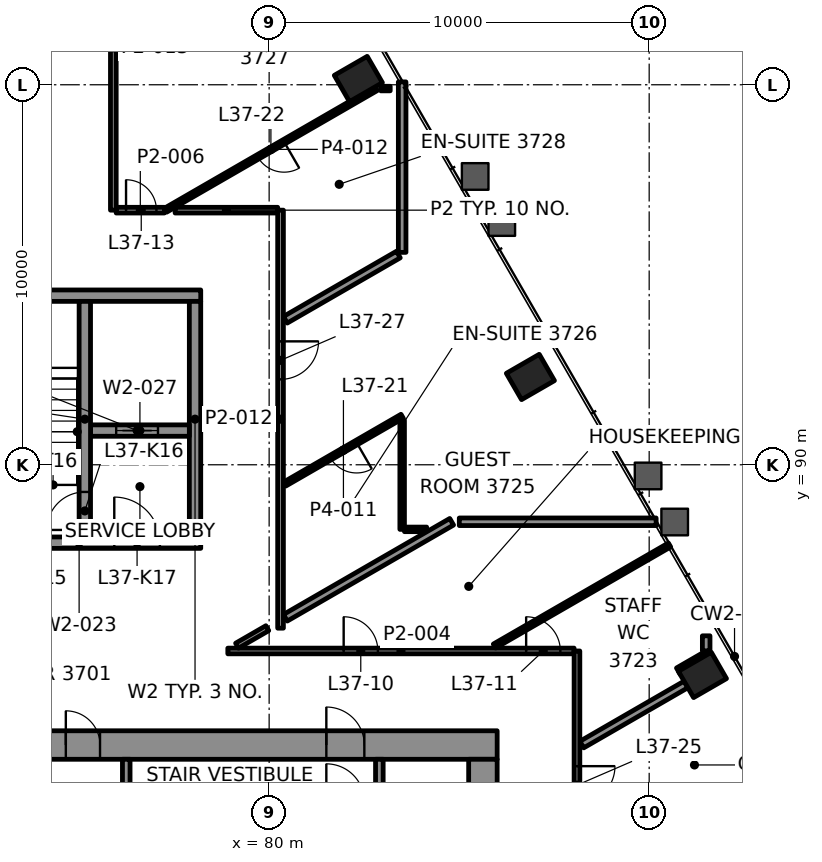
"""IFC4 building model, lengths in metres.
Left out: names, types, materials, properties, quantities, classifications, styles, units other than length and angle.
Written with IfcOpenShell. Run it as: python <this file> out.ifc"""

import sys

from ifc_helpers import new_model, si_unit, direction, frame, frame_2d, origin, origin_2d, place, context, subcontext, project, spatial, rectangle, hollow_rectangle, extrude, element, fill, save


model = new_model("IFC4")
c1 = context("Model", 3, precision=1e-05, world=origin(), true_north=direction((0.0, 1.0)))
c2 = subcontext(c1, "Body", "Model", "MODEL_VIEW")
j1 = project(units=[si_unit("LENGTHUNIT", "METRE"), si_unit("PLANEANGLEUNIT", "RADIAN")], contexts=[c1])
p1 = place(None, origin())
s1 = spatial("IfcSite", under=j1, at=p1, CompositionType="ELEMENT")
p2 = place(p1, origin())
s2 = spatial("IfcBuilding", under=s1, at=p2, CompositionType="ELEMENT")
p3 = place(p2, frame((0.0, 0.0, 163.6)))
s3 = spatial("IfcBuildingStorey", under=s2, at=p3, CompositionType="ELEMENT", Elevation=163.6)
for number, where, z_axis, x_axis in (
    (1, (91.402, 84.469, -0.0), (0.0, 0.0, 1.0), (-0.5, 0.866, 0.0)),
    (2, (86.875, 92.31, -0.0), (0.0, 0.0, 1.0), (-0.5, 0.866, 0.0)),
    (3, (82.348, 100.151, -0.0), (0.0, 0.0, 1.0), (-0.5, 0.866, 0.0)),
):
    element("IfcColumn", number, at=place(p3, frame(where, z_axis=z_axis, x_axis=x_axis)), inside=s3, PredefinedType="COLUMN", context=c2, shape_type="SweptSolid", body=[
        extrude(hollow_rectangle(XDim=0.8, YDim=1.0, WallThickness=0.05, at=origin_2d()), origin(), (0.0, 0.0, 1.0), 3.9),
    ])
p4 = place(p3, frame((64.0, 82.625, 0.0), z_axis=(0.0, 0.0, 1.0), x_axis=(1.0, 0.0, 0.0)))
e4 = element("IfcWall", 4, at=p4, inside=s3, PredefinedType="SHEAR", context=c2, shape_type="SweptSolid", body=[
    extrude(rectangle(XDim=22.0, YDim=0.75, at=frame_2d((11.0, 0.0))), origin(), (0.0, 0.0, 1.0), 3.7),
])
p5 = place(p4, frame((3.695, 0.0, 0.0)))
e5 = element("IfcOpeningElement", 5, at=p5, cuts=e4, PredefinedType="OPENING", context=c2, shape_type="SweptSolid", body=[
    extrude(rectangle(XDim=1.0, YDim=2.1, at=frame_2d((0.5, 1.05))), frame((0.0, 0.385, 0.0), z_axis=(0.0, -1.0, 0.0), x_axis=(1.0, 0.0, 0.0)), (0.0, 0.0, 1.0), 0.77),
])
p6 = place(p4, frame((17.505, 0.0, 0.0)))
e6 = element("IfcOpeningElement", 6, at=p6, cuts=e4, PredefinedType="OPENING", context=c2, shape_type="SweptSolid", body=[
    extrude(rectangle(XDim=1.0, YDim=2.1, at=frame_2d((0.5, 1.05))), frame((0.0, 0.385, 0.0), z_axis=(0.0, -1.0, 0.0), x_axis=(1.0, 0.0, 0.0)), (0.0, 0.0, 1.0), 0.77),
])
p7 = place(p4, frame((10.65, 0.0, 0.0)))
e7 = element("IfcOpeningElement", 7, at=p7, cuts=e4, PredefinedType="OPENING", context=c2, shape_type="SweptSolid", body=[
    extrude(rectangle(XDim=0.9, YDim=2.1, at=frame_2d((0.45, 1.05))), frame((0.0, 0.385, 0.0), z_axis=(0.0, -1.0, 0.0), x_axis=(1.0, 0.0, 0.0)), (0.0, 0.0, 1.0), 0.77),
])
p8 = place(p3, frame((85.625, 67.75, 0.0), z_axis=(0.0, 0.0, 1.0), x_axis=(0.0, 1.0, 0.0)))
e8 = element("IfcWall", 8, at=p8, inside=s3, PredefinedType="SHEAR", context=c2, shape_type="SweptSolid", body=[
    extrude(rectangle(XDim=14.5, YDim=0.75, at=frame_2d((7.25, 0.0))), origin(), (0.0, 0.0, 1.0), 3.7),
])
p9 = place(p8, frame((4.65, 0.0, 0.0)))
e9 = element("IfcOpeningElement", 9, at=p9, cuts=e8, PredefinedType="OPENING", context=c2, shape_type="SweptSolid", body=[
    extrude(rectangle(XDim=1.8, YDim=2.1, at=frame_2d((0.9, 1.05))), frame((0.0, 0.385, 0.0), z_axis=(0.0, -1.0, 0.0), x_axis=(1.0, 0.0, 0.0)), (0.0, 0.0, 1.0), 0.77),
])
p10 = place(p8, frame((11.8, 0.0, 0.0)))
e10 = element("IfcOpeningElement", 10, at=p10, cuts=e8, PredefinedType="OPENING", context=c2, shape_type="SweptSolid", body=[
    extrude(rectangle(XDim=0.9, YDim=2.1, at=frame_2d((0.45, 1.05))), frame((0.0, 0.385, 0.0), z_axis=(0.0, -1.0, 0.0), x_axis=(1.0, 0.0, 0.0)), (0.0, 0.0, 1.0), 0.77),
])
p11 = place(p3, frame((71.8, 87.95, 0.0), z_axis=(0.0, 0.0, 1.0), x_axis=(1.0, 0.0, 0.0)))
e11 = element("IfcWall", 11, at=p11, inside=s3, PredefinedType="SHEAR", context=c2, shape_type="SweptSolid", body=[
    extrude(rectangle(XDim=6.4, YDim=0.3, at=frame_2d((3.2, 0.0))), origin(), (0.0, 0.0, 1.0), 3.7),
])
p12 = place(p11, frame((1.325, 0.0, 0.0)))
e12 = element("IfcOpeningElement", 12, at=p12, cuts=e11, PredefinedType="OPENING", context=c2, shape_type="SweptSolid", body=[
    extrude(rectangle(XDim=1.0, YDim=2.1, at=frame_2d((0.5, 1.05))), frame((0.0, 0.16, 0.0), z_axis=(0.0, -1.0, 0.0), x_axis=(1.0, 0.0, 0.0)), (0.0, 0.0, 1.0), 0.32),
])
p13 = place(p11, frame((4.125, 0.0, 0.0)))
e13 = element("IfcOpeningElement", 13, at=p13, cuts=e11, PredefinedType="OPENING", context=c2, shape_type="SweptSolid", body=[
    extrude(rectangle(XDim=1.2, YDim=2.1, at=frame_2d((0.6, 1.05))), frame((0.0, 0.16, 0.0), z_axis=(0.0, -1.0, 0.0), x_axis=(1.0, 0.0, 0.0)), (0.0, 0.0, 1.0), 0.32),
])
p14 = place(p3, frame((71.8, 94.45, 0.0), z_axis=(0.0, 0.0, 1.0), x_axis=(1.0, 0.0, 0.0)))
e14 = element("IfcWall", 14, at=p14, inside=s3, PredefinedType="SHEAR", context=c2, shape_type="SweptSolid", body=[
    extrude(rectangle(XDim=6.4, YDim=0.3, at=frame_2d((3.2, 0.0))), origin(), (0.0, 0.0, 1.0), 3.7),
])
p15 = place(p3, frame((78.05, 88.1, 0.0), z_axis=(0.0, 0.0, 1.0), x_axis=(0.0, 1.0, 0.0)))
e15 = element("IfcWall", 15, at=p15, inside=s3, PredefinedType="SHEAR", context=c2, shape_type="SweptSolid", body=[
    extrude(rectangle(XDim=6.2, YDim=0.3, at=frame_2d((3.1, 0.0))), origin(), (0.0, 0.0, 1.0), 3.7),
])
p16 = place(p3, frame((75.3, 90.9, 0.0), z_axis=(0.0, 0.0, 1.0), x_axis=(1.0, 0.0, 0.0)))
e16 = element("IfcWall", 16, at=p16, inside=s3, PredefinedType="SHEAR", context=c2, shape_type="SweptSolid", body=[
    extrude(rectangle(XDim=2.6, YDim=0.3, at=frame_2d((1.3, 0.0))), origin(), (0.0, 0.0, 1.0), 3.7),
])
p17 = place(p16, frame((0.675, 0.0, 0.0)))
e17 = element("IfcOpeningElement", 17, at=p17, cuts=e16, PredefinedType="OPENING", context=c2, shape_type="SweptSolid", body=[
    extrude(rectangle(XDim=1.1, YDim=2.1, at=frame_2d((0.55, 1.05))), frame((0.0, 0.16, 0.0), z_axis=(0.0, -1.0, 0.0), x_axis=(1.0, 0.0, 0.0)), (0.0, 0.0, 1.0), 0.32),
])
p18 = place(p3, frame((75.15, 88.1, 0.0), z_axis=(0.0, 0.0, 1.0), x_axis=(0.0, 1.0, 0.0)))
e18 = element("IfcWall", 18, at=p18, inside=s3, PredefinedType="SHEAR", context=c2, shape_type="SweptSolid", body=[
    extrude(rectangle(XDim=6.2, YDim=0.3, at=frame_2d((3.1, 0.0))), origin(), (0.0, 0.0, 1.0), 3.7),
])
p19 = place(p18, frame((0.185, 0.0, 0.0)))
e19 = element("IfcOpeningElement", 19, at=p19, cuts=e18, PredefinedType="OPENING", context=c2, shape_type="SweptSolid", body=[
    extrude(rectangle(XDim=1.0, YDim=2.1, at=frame_2d((0.5, 1.05))), frame((0.0, 0.16, 0.0), z_axis=(0.0, -1.0, 0.0), x_axis=(1.0, 0.0, 0.0)), (0.0, 0.0, 1.0), 0.32),
])
p20 = place(p3, frame((78.913, 85.1, 0.0), z_axis=(0.0, 0.0, 1.0), x_axis=(1.0, 0.0, 0.0)))
e20 = element("IfcWall", 20, at=p20, inside=s3, PredefinedType="PARTITIONING", context=c2, shape_type="SweptSolid", body=[
    extrude(rectangle(XDim=9.112, YDim=0.15, at=frame_2d((4.556, 0.0))), origin(), (0.0, 0.0, 1.0), 3.1),
])
p21 = place(p20, frame((3.048, 0.0, 0.0)))
e21 = element("IfcOpeningElement", 21, at=p21, cuts=e20, PredefinedType="OPENING", context=c2, shape_type="SweptSolid", body=[
    extrude(rectangle(XDim=0.9, YDim=2.1, at=frame_2d((0.45, 1.05))), frame((0.0, 0.085, 0.0), z_axis=(0.0, -1.0, 0.0), x_axis=(1.0, 0.0, 0.0)), (0.0, 0.0, 1.0), 0.17),
])
p22 = place(p20, frame((7.85, 0.0, 0.0)))
e22 = element("IfcOpeningElement", 22, at=p22, cuts=e20, PredefinedType="OPENING", context=c2, shape_type="SweptSolid", body=[
    extrude(rectangle(XDim=0.9, YDim=2.1, at=frame_2d((0.45, 1.05))), frame((0.0, 0.085, 0.0), z_axis=(0.0, -1.0, 0.0), x_axis=(1.0, 0.0, 0.0)), (0.0, 0.0, 1.0), 0.17),
])
p23 = place(p3, frame((83.56, 88.3, 0.0), z_axis=(0.0, 0.0, 1.0), x_axis=(1.0, 0.0, 0.0)))
e23 = element("IfcWall", 23, at=p23, inside=s3, PredefinedType="PARTITIONING", context=c2, shape_type="SweptSolid", body=[
    extrude(rectangle(XDim=0.585, YDim=0.12, at=frame_2d((0.292, 0.0))), origin(), (0.0, 0.0, 1.0), 3.1),
])
p24 = place(p3, frame((85.004, 88.5, 0.0), z_axis=(0.0, 0.0, 1.0), x_axis=(1.0, 0.0, 0.0)))
e24 = element("IfcWall", 24, at=p24, inside=s3, PredefinedType="PARTITIONING", context=c2, shape_type="SweptSolid", body=[
    extrude(rectangle(XDim=5.179, YDim=0.2, at=frame_2d((2.59, 0.0))), origin(), (0.0, 0.0, 1.0), 2.865),
])
p25 = place(p3, frame((75.975, 96.7, 0.0), z_axis=(0.0, 0.0, 1.0), x_axis=(1.0, 0.0, 0.0)))
e25 = element("IfcWall", 25, at=p25, inside=s3, PredefinedType="PARTITIONING", context=c2, shape_type="SweptSolid", body=[
    extrude(rectangle(XDim=1.27, YDim=0.15, at=frame_2d((0.635, 0.0))), origin(), (0.0, 0.0, 1.0), 3.1),
])
p26 = place(p25, frame((0.26, 0.0, 0.0)))
e26 = element("IfcOpeningElement", 26, at=p26, cuts=e25, PredefinedType="OPENING", context=c2, shape_type="SweptSolid", body=[
    extrude(rectangle(XDim=0.8, YDim=2.1, at=frame_2d((0.4, 1.05))), frame((0.0, 0.085, 0.0), z_axis=(0.0, -1.0, 0.0), x_axis=(1.0, 0.0, 0.0)), (0.0, 0.0, 1.0), 0.17),
])
p27 = place(p3, frame((82.938, 99.9, 0.0), z_axis=(0.0, 0.0, 1.0), x_axis=(1.0, 0.0, 0.0)))
e27 = element("IfcWall", 27, at=p27, inside=s3, PredefinedType="PARTITIONING", context=c2, shape_type="SweptSolid", body=[
    extrude(rectangle(XDim=0.248, YDim=0.12, at=frame_2d((0.124, 0.0))), origin(), (0.0, 0.0, 1.0), 3.1),
])
p28 = place(p3, frame((88.227, 82.637, 0.0), z_axis=(0.0, 0.0, 1.0), x_axis=(0.866046892487, 0.499962778628, 0.0)))
e28 = element("IfcWall", 28, at=p28, inside=s3, PredefinedType="PARTITIONING", context=c2, shape_type="SweptSolid", body=[
    extrude(rectangle(XDim=3.166, YDim=0.2, at=frame_2d((1.583, 0.0))), origin(), (0.0, 0.0, 1.0), 3.1),
])
p29 = place(p3, frame((90.769, 84.566, 0.0), z_axis=(0.0, 0.0, 1.0), x_axis=(0.865993035835, 0.500056058743, 0.0)))
e29 = element("IfcWall", 29, at=p29, inside=s3, PredefinedType="PARTITIONING", context=c2, shape_type="SweptSolid", body=[
    extrude(rectangle(XDim=0.845, YDim=0.2, at=frame_2d((0.422, 0.0))), origin(), (0.0, 0.0, 1.0), 2.865),
])
p30 = place(p3, frame((85.928, 85.23, 0.0), z_axis=(0.0, 0.0, 1.0), x_axis=(0.866037319036, 0.49997936161, 0.0)))
e30 = element("IfcWall", 30, at=p30, inside=s3, PredefinedType="PARTITIONING", context=c2, shape_type="SweptSolid", body=[
    extrude(rectangle(XDim=5.32, YDim=0.12, at=frame_2d((2.66, 0.0))), origin(), (0.0, 0.0, 1.0), 2.865),
])
p31 = place(p3, frame((79.156, 85.24, 0.0), z_axis=(0.0, 0.0, 1.0), x_axis=(0.866013213425, 0.500021113727, 0.0)))
e31 = element("IfcWall", 31, at=p31, inside=s3, PredefinedType="PARTITIONING", context=c2, shape_type="SweptSolid", body=[
    extrude(rectangle(XDim=0.92, YDim=0.15, at=frame_2d((0.46, 0.0))), origin(), (0.0, 0.0, 1.0), 3.1),
])
p32 = place(p3, frame((80.427, 85.974, 0.0), z_axis=(0.0, 0.0, 1.0), x_axis=(0.866031085144, 0.499990159468, 0.0)))
e32 = element("IfcWall", 32, at=p32, inside=s3, PredefinedType="PARTITIONING", context=c2, shape_type="SweptSolid", body=[
    extrude(rectangle(XDim=5.052, YDim=0.2, at=frame_2d((2.526, 0.0))), origin(), (0.0, 0.0, 1.0), 3.1),
])
p33 = place(p3, frame((83.5, 91.277, 0.0), z_axis=(0.0, 0.0, 1.0), x_axis=(-0.866028357664, -0.499994883695, 0.0)))
e33 = element("IfcWall", 33, at=p33, inside=s3, PredefinedType="PARTITIONING", context=c2, shape_type="SweptSolid", body=[
    extrude(rectangle(XDim=3.568, YDim=0.12, at=frame_2d((1.784, 0.0))), origin(), (0.0, 0.0, 1.0), 3.1),
])
p34 = place(p33, frame((1.384, 0.0, 0.0)))
e34 = element("IfcOpeningElement", 34, at=p34, cuts=e33, PredefinedType="OPENING", context=c2, shape_type="SweptSolid", body=[
    extrude(rectangle(XDim=0.8, YDim=2.1, at=frame_2d((0.4, 1.05))), frame((0.0, 0.07, 0.0), z_axis=(0.0, -1.0, 0.0), x_axis=(1.0, 0.0, 0.0)), (0.0, 0.0, 1.0), 0.14),
])
p35 = place(p3, frame((80.427, 93.815, 0.0), z_axis=(0.0, 0.0, 1.0), x_axis=(0.866037544249, 0.499978971509, 0.0)))
e35 = element("IfcWall", 35, at=p35, inside=s3, PredefinedType="PARTITIONING", context=c2, shape_type="SweptSolid", body=[
    extrude(rectangle(XDim=3.433, YDim=0.2, at=frame_2d((1.716, 0.0))), origin(), (0.0, 0.0, 1.0), 3.1),
])
p36 = place(p3, frame((82.818, 99.9, 0.0), z_axis=(0.0, 0.0, 1.0), x_axis=(-0.866025499775, -0.499999833739, 0.0)))
e36 = element("IfcWall", 36, at=p36, inside=s3, PredefinedType="PARTITIONING", context=c2, shape_type="SweptSolid", body=[
    extrude(rectangle(XDim=6.4, YDim=0.12, at=frame_2d((3.2, 0.0))), origin(), (0.0, 0.0, 1.0), 2.865),
])
p37 = place(p36, frame((2.8, 0.0, 0.0)))
e37 = element("IfcOpeningElement", 37, at=p37, cuts=e36, PredefinedType="OPENING", context=c2, shape_type="SweptSolid", body=[
    extrude(rectangle(XDim=0.8, YDim=2.1, at=frame_2d((0.4, 1.05))), frame((0.0, 0.07, 0.0), z_axis=(0.0, -1.0, 0.0), x_axis=(1.0, 0.0, 0.0)), (0.0, 0.0, 1.0), 0.14),
])
p38 = place(p3, frame((91.5, 85.104, 0.0), z_axis=(0.0, 0.0, 1.0), x_axis=(0.0, 1.0, 0.0)))
e38 = element("IfcWall", 38, at=p38, inside=s3, PredefinedType="PARTITIONING", context=c2, shape_type="SweptSolid", body=[
    extrude(rectangle(XDim=0.395, YDim=0.2, at=frame_2d((0.198, 0.0))), origin(), (0.0, 0.0, 1.0), 3.1),
])
p39 = place(p3, frame((88.1, 85.1, 0.0), z_axis=(0.0, 0.0, 1.0), x_axis=(0.0, -1.0, 0.0)))
e39 = element("IfcWall", 39, at=p39, inside=s3, PredefinedType="PARTITIONING", context=c2, shape_type="SweptSolid", body=[
    extrude(rectangle(XDim=16.624, YDim=0.15, at=frame_2d((8.312, 0.0))), origin(), (0.0, 0.0, 1.0), 3.1),
])
p40 = place(p39, frame((3.031, 0.0, 0.0)))
e40 = element("IfcOpeningElement", 40, at=p40, cuts=e39, PredefinedType="OPENING", context=c2, shape_type="SweptSolid", body=[
    extrude(rectangle(XDim=1.0, YDim=2.1, at=frame_2d((0.5, 1.05))), frame((0.0, 0.085, 0.0), z_axis=(0.0, -1.0, 0.0), x_axis=(1.0, 0.0, 0.0)), (0.0, 0.0, 1.0), 0.17),
])
p41 = place(p39, frame((10.872, 0.0, 0.0)))
e41 = element("IfcOpeningElement", 41, at=p41, cuts=e39, PredefinedType="OPENING", context=c2, shape_type="SweptSolid", body=[
    extrude(rectangle(XDim=1.0, YDim=2.1, at=frame_2d((0.5, 1.05))), frame((0.0, 0.085, 0.0), z_axis=(0.0, -1.0, 0.0), x_axis=(1.0, 0.0, 0.0)), (0.0, 0.0, 1.0), 0.17),
])
p42 = place(p3, frame((83.5, 88.3, 0.0), z_axis=(0.0, 0.0, 1.0), x_axis=(0.0, 1.0, 0.0)))
e42 = element("IfcWall", 42, at=p42, inside=s3, PredefinedType="PARTITIONING", context=c2, shape_type="SweptSolid", body=[
    extrude(rectangle(XDim=2.868, YDim=0.12, at=frame_2d((1.434, 0.0))), origin(), (0.0, 0.0, 1.0), 3.022),
])
p43 = place(p3, frame((83.5, 95.589, 0.0), z_axis=(0.0, 0.0, 1.0), x_axis=(0.0, 1.0, 0.0)))
e43 = element("IfcWall", 43, at=p43, inside=s3, PredefinedType="PARTITIONING", context=c2, shape_type="SweptSolid", body=[
    extrude(rectangle(XDim=4.486, YDim=0.2, at=frame_2d((2.243, 0.0))), origin(), (0.0, 0.0, 1.0), 2.865),
])
p44 = place(p3, frame((80.3, 96.7, 0.0), z_axis=(0.0, 0.0, 1.0), x_axis=(0.0, -1.0, 0.0)))
e44 = element("IfcWall", 44, at=p44, inside=s3, PredefinedType="PARTITIONING", context=c2, shape_type="SweptSolid", body=[
    extrude(rectangle(XDim=11.0, YDim=0.15, at=frame_2d((5.5, 0.0))), origin(), (0.0, 0.0, 1.0), 3.022),
])
p45 = place(p44, frame((3.452, 0.0, 0.0)))
e45 = element("IfcOpeningElement", 45, at=p45, cuts=e44, PredefinedType="OPENING", context=c2, shape_type="SweptSolid", body=[
    extrude(rectangle(XDim=1.0, YDim=2.1, at=frame_2d((0.5, 1.05))), frame((0.0, 0.085, 0.0), z_axis=(0.0, -1.0, 0.0), x_axis=(1.0, 0.0, 0.0)), (0.0, 0.0, 1.0), 0.17),
])
p46 = place(p3, frame((75.9, 105.242, 0.0), z_axis=(0.0, 0.0, 1.0), x_axis=(0.0, -1.0, 0.0)))
e46 = element("IfcWall", 46, at=p46, inside=s3, PredefinedType="PARTITIONING", context=c2, shape_type="SweptSolid", body=[
    extrude(rectangle(XDim=8.542, YDim=0.15, at=frame_2d((4.271, 0.0))), origin(), (0.0, 0.0, 1.0), 3.1),
])
p47 = place(p46, frame((1.445, 0.0, 0.0)))
e47 = element("IfcOpeningElement", 47, at=p47, cuts=e46, PredefinedType="OPENING", context=c2, shape_type="SweptSolid", body=[
    extrude(rectangle(XDim=0.9, YDim=2.1, at=frame_2d((0.45, 1.05))), frame((0.0, 0.085, 0.0), z_axis=(0.0, -1.0, 0.0), x_axis=(1.0, 0.0, 0.0)), (0.0, 0.0, 1.0), 0.17),
])
p48 = place(p3, frame((77.525, 96.7, 0.0), z_axis=(0.0, 0.0, 1.0), x_axis=(1.0, 0.0, 0.0)))
e48 = element("IfcWall", 48, at=p48, inside=s3, PredefinedType="PARTITIONING", context=c2, shape_type="SweptSolid", body=[
    extrude(rectangle(XDim=2.7, YDim=0.15, at=frame_2d((1.35, 0.0))), origin(), (0.0, 0.0, 1.0), 3.1),
])
for number, where, z_axis, x_axis in (
    (49, (76.24, 81.28, 0.0), (0.0, 0.0, 1.0), (0.0, 1.0, 0.0)),
    (50, (82.9, 81.28, 0.0), (0.0, 0.0, 1.0), (0.0, 1.0, 0.0)),
):
    element("IfcWall", number, at=place(p3, frame(where, z_axis=z_axis, x_axis=x_axis)), inside=s3, PredefinedType="PARTITIONING", context=c2, shape_type="SweptSolid", body=[
        extrude(rectangle(XDim=0.97, YDim=0.2, at=frame_2d((0.485, 0.0))), origin(), (0.0, 0.0, 1.0), 3.7),
    ])
p49 = place(p21, origin())
e51 = element("IfcDoor", 51, at=p49, inside=s3, OperationType="SINGLE_SWING_LEFT", PredefinedType="DOOR", context=c2, shape_type="SweptSolid", body=[
    extrude(rectangle(XDim=0.9, YDim=2.1, at=frame_2d((0.45, 1.05))), frame((0.0, 0.025, 0.0), z_axis=(0.0, -1.0, 0.0), x_axis=(1.0, 0.0, 0.0)), (0.0, 0.0, 1.0), 0.05),
])
fill(e21, e51)
p50 = place(p22, origin())
e52 = element("IfcDoor", 52, at=p50, inside=s3, OperationType="SINGLE_SWING_RIGHT", PredefinedType="DOOR", context=c2, shape_type="SweptSolid", body=[
    extrude(rectangle(XDim=0.9, YDim=2.1, at=frame_2d((0.45, 1.05))), frame((0.0, 0.025, 0.0), z_axis=(0.0, -1.0, 0.0), x_axis=(1.0, 0.0, 0.0)), (0.0, 0.0, 1.0), 0.05),
])
fill(e22, e52)
p51 = place(p26, origin())
e53 = element("IfcDoor", 53, at=p51, inside=s3, OperationType="SINGLE_SWING_RIGHT", PredefinedType="DOOR", context=c2, shape_type="SweptSolid", body=[
    extrude(rectangle(XDim=0.8, YDim=2.1, at=frame_2d((0.4, 1.05))), frame((0.0, 0.025, 0.0), z_axis=(0.0, -1.0, 0.0), x_axis=(1.0, 0.0, 0.0)), (0.0, 0.0, 1.0), 0.05),
])
fill(e26, e53)
p52 = place(p34, origin())
e54 = element("IfcDoor", 54, at=p52, inside=s3, OperationType="SINGLE_SWING_RIGHT", PredefinedType="DOOR", context=c2, shape_type="SweptSolid", body=[
    extrude(rectangle(XDim=0.8, YDim=2.1, at=frame_2d((0.4, 1.05))), frame((0.0, 0.025, 0.0), z_axis=(0.0, -1.0, 0.0), x_axis=(1.0, 0.0, 0.0)), (0.0, 0.0, 1.0), 0.05),
])
fill(e34, e54)
p53 = place(p37, origin())
e55 = element("IfcDoor", 55, at=p53, inside=s3, OperationType="SINGLE_SWING_RIGHT", PredefinedType="DOOR", context=c2, shape_type="SweptSolid", body=[
    extrude(rectangle(XDim=0.8, YDim=2.1, at=frame_2d((0.4, 1.05))), frame((0.0, 0.025, 0.0), z_axis=(0.0, -1.0, 0.0), x_axis=(1.0, 0.0, 0.0)), (0.0, 0.0, 1.0), 0.05),
])
fill(e37, e55)
p54 = place(p40, origin())
e56 = element("IfcDoor", 56, at=p54, inside=s3, OperationType="SINGLE_SWING_LEFT", PredefinedType="DOOR", context=c2, shape_type="SweptSolid", body=[
    extrude(rectangle(XDim=1.0, YDim=2.1, at=frame_2d((0.5, 1.05))), frame((0.0, 0.025, 0.0), z_axis=(0.0, -1.0, 0.0), x_axis=(1.0, 0.0, 0.0)), (0.0, 0.0, 1.0), 0.05),
])
fill(e40, e56)
p55 = place(p45, origin())
e57 = element("IfcDoor", 57, at=p55, inside=s3, OperationType="SINGLE_SWING_LEFT", PredefinedType="DOOR", context=c2, shape_type="SweptSolid", body=[
    extrude(rectangle(XDim=1.0, YDim=2.1, at=frame_2d((0.5, 1.05))), frame((0.0, 0.025, 0.0), z_axis=(0.0, -1.0, 0.0), x_axis=(1.0, 0.0, 0.0)), (0.0, 0.0, 1.0), 0.05),
])
fill(e45, e57)
p56 = place(p17, origin())
e58 = element("IfcDoor", 58, at=p56, inside=s3, OperationType="DOUBLE_DOOR_SLIDING", PredefinedType="DOOR", context=c2, shape_type="SweptSolid", body=[
    extrude(rectangle(XDim=1.1, YDim=2.1, at=frame_2d((0.55, 1.05))), frame((0.0, 0.025, 0.0), z_axis=(0.0, -1.0, 0.0), x_axis=(1.0, 0.0, 0.0)), (0.0, 0.0, 1.0), 0.05),
])
fill(e17, e58)
p57 = place(p6, origin())
e59 = element("IfcDoor", 59, at=p57, inside=s3, OperationType="SINGLE_SWING_LEFT", PredefinedType="DOOR", context=c2, shape_type="SweptSolid", body=[
    extrude(rectangle(XDim=1.0, YDim=2.1, at=frame_2d((0.5, 1.05))), frame((0.0, 0.095, 0.0), z_axis=(0.0, -1.0, 0.0), x_axis=(1.0, 0.0, 0.0)), (0.0, 0.0, 1.0), 0.19),
])
fill(e6, e59)
p58 = place(p19, origin())
e60 = element("IfcDoor", 60, at=p58, inside=s3, OperationType="SINGLE_SWING_LEFT", PredefinedType="DOOR", context=c2, shape_type="SweptSolid", body=[
    extrude(rectangle(XDim=1.0, YDim=2.1, at=frame_2d((0.5, 1.05))), frame((0.0, 0.025, 0.0), z_axis=(0.0, -1.0, 0.0), x_axis=(1.0, 0.0, 0.0)), (0.0, 0.0, 1.0), 0.05),
])
fill(e19, e60)
p59 = place(p13, origin())
e61 = element("IfcDoor", 61, at=p59, inside=s3, OperationType="SINGLE_SWING_RIGHT", PredefinedType="DOOR", context=c2, shape_type="SweptSolid", body=[
    extrude(rectangle(XDim=1.2, YDim=2.1, at=frame_2d((0.6, 1.05))), frame((0.0, 0.025, 0.0), z_axis=(0.0, -1.0, 0.0), x_axis=(1.0, 0.0, 0.0)), (0.0, 0.0, 1.0), 0.05),
])
fill(e13, e61)
p60 = place(p7, origin())
e62 = element("IfcDoor", 62, at=p60, inside=s3, OperationType="SINGLE_SWING_LEFT", PredefinedType="DOOR", context=c2, shape_type="SweptSolid", body=[
    extrude(rectangle(XDim=0.9, YDim=2.1, at=frame_2d((0.45, 1.05))), frame((0.0, 0.095, 0.0), z_axis=(0.0, -1.0, 0.0), x_axis=(1.0, 0.0, 0.0)), (0.0, 0.0, 1.0), 0.19),
])
fill(e7, e62)
save(model, sys.argv[1])
